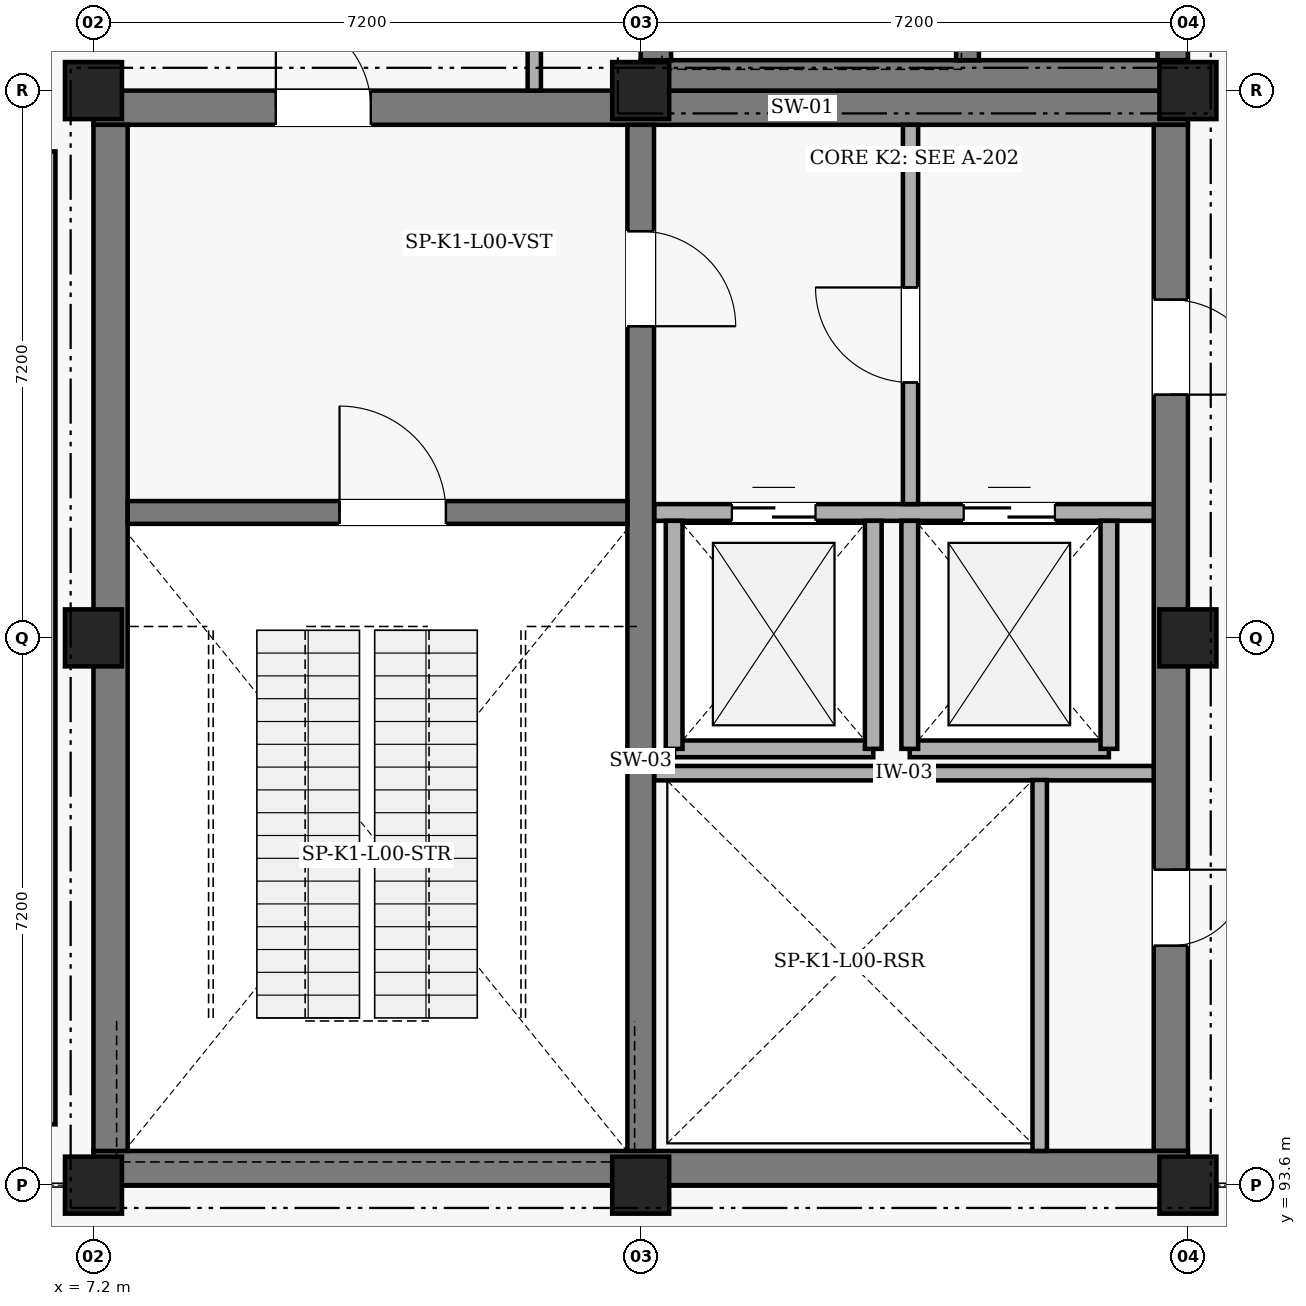
"""IFC4 building model, lengths in metres.
Left out: names, types, materials, properties, quantities, classifications, styles, units other than length and angle.
Written with IfcOpenShell. Run it as: python <this file> out.ifc"""

import sys

from ifc_helpers import new_model, si_unit, direction, frame, frame_2d, origin, origin_2d, place, context, subcontext, project, spatial, rectangle, extrude, element, fill, save


model = new_model("IFC4")
c1 = context("Model", 3, precision=1e-05, world=origin(), true_north=direction((0.0, 1.0)))
c2 = subcontext(c1, "Body", "Model", "MODEL_VIEW")
j1 = project(units=[si_unit("LENGTHUNIT", "METRE"), si_unit("PLANEANGLEUNIT", "RADIAN")], contexts=[c1])
p1 = place(None, origin())
s1 = spatial("IfcSite", under=j1, at=p1, CompositionType="ELEMENT")
p2 = place(p1, origin())
s2 = spatial("IfcBuilding", under=s1, at=p2, CompositionType="ELEMENT")
p3 = place(p2, origin())
s3 = spatial("IfcBuildingStorey", under=s2, at=p3, CompositionType="ELEMENT", Elevation=0.0)
p4 = place(p3, frame((7.2, 107.775, 0.0), z_axis=(0.0, 0.0, 1.0), x_axis=(1.0, 0.0, 0.0)))
e1 = element("IfcWall", 1, at=p4, inside=s3, PredefinedType="SHEAR", context=c2, shape_type="SweptSolid", body=[
    extrude(rectangle(XDim=14.4, YDim=0.45, at=frame_2d((7.2, 0.0))), origin(), (0.0, 0.0, 1.0), 5.4),
])
p5 = place(p4, frame((2.4, 0.0, 0.0)))
e2 = element("IfcOpeningElement", 2, at=p5, cuts=e1, PredefinedType="OPENING", context=c2, shape_type="SweptSolid", body=[
    extrude(rectangle(XDim=1.25, YDim=2.2, at=frame_2d((0.625, 1.1))), frame((0.0, 0.235, 0.0), z_axis=(0.0, -1.0, 0.0), x_axis=(1.0, 0.0, 0.0)), (0.0, 0.0, 1.0), 0.47),
])
p6 = place(p3, frame((21.375, 107.55, 0.0), z_axis=(0.0, 0.0, 1.0), x_axis=(0.0, -1.0, 0.0)))
e3 = element("IfcWall", 3, at=p6, inside=s3, PredefinedType="SHEAR", context=c2, shape_type="SweptSolid", body=[
    extrude(rectangle(XDim=13.5, YDim=0.45, at=frame_2d((6.75, 0.0))), origin(), (0.0, 0.0, 1.0), 5.4),
])
p7 = place(p6, frame((9.8, 0.0, 0.0)))
e4 = element("IfcOpeningElement", 4, at=p7, cuts=e3, PredefinedType="OPENING", context=c2, shape_type="SweptSolid", body=[
    extrude(rectangle(XDim=1.0, YDim=2.15, at=frame_2d((0.5, 1.075))), frame((0.0, 0.235, 0.0), z_axis=(0.0, -1.0, 0.0), x_axis=(1.0, 0.0, 0.0)), (0.0, 0.0, 1.0), 0.47),
])
p8 = place(p6, frame((2.3, 0.0, 0.0)))
e5 = element("IfcOpeningElement", 5, at=p8, cuts=e3, PredefinedType="OPENING", context=c2, shape_type="SweptSolid", body=[
    extrude(rectangle(XDim=1.25, YDim=2.2, at=frame_2d((0.625, 1.1))), frame((0.0, 0.235, 0.0), z_axis=(0.0, -1.0, 0.0), x_axis=(1.0, 0.0, 0.0)), (0.0, 0.0, 1.0), 0.47),
])
p9 = place(p3, frame((21.6, 93.825, 0.0), z_axis=(0.0, 0.0, 1.0), x_axis=(-1.0, 0.0, 0.0)))
e6 = element("IfcWall", 6, at=p9, inside=s3, PredefinedType="SHEAR", context=c2, shape_type="SweptSolid", body=[
    extrude(rectangle(XDim=14.4, YDim=0.45, at=frame_2d((7.2, 0.0))), origin(), (0.0, 0.0, 1.0), 5.4),
])
p10 = place(p3, frame((7.425, 94.05, 0.0), z_axis=(0.0, 0.0, 1.0), x_axis=(0.0, 1.0, 0.0)))
e7 = element("IfcWall", 7, at=p10, inside=s3, PredefinedType="SHEAR", context=c2, shape_type="SweptSolid", body=[
    extrude(rectangle(XDim=13.5, YDim=0.45, at=frame_2d((6.75, 0.0))), origin(), (0.0, 0.0, 1.0), 5.4),
])
p11 = place(p3, frame((14.4, 107.55, 0.0), z_axis=(0.0, 0.0, 1.0), x_axis=(0.0, -1.0, 0.0)))
e8 = element("IfcWall", 8, at=p11, inside=s3, PredefinedType="SHEAR", context=c2, shape_type="SweptSolid", body=[
    extrude(rectangle(XDim=13.5, YDim=0.35, at=frame_2d((6.75, 0.0))), origin(), (0.0, 0.0, 1.0), 5.4),
])
p12 = place(p11, frame((1.4, 0.0, 0.0)))
e9 = element("IfcOpeningElement", 9, at=p12, cuts=e8, PredefinedType="OPENING", context=c2, shape_type="SweptSolid", body=[
    extrude(rectangle(XDim=1.25, YDim=2.2, at=frame_2d((0.625, 1.1))), frame((0.0, 0.185, 0.0), z_axis=(0.0, -1.0, 0.0), x_axis=(1.0, 0.0, 0.0)), (0.0, 0.0, 1.0), 0.37),
])
p13 = place(p3, frame((7.65, 102.45, 0.0), z_axis=(0.0, 0.0, 1.0), x_axis=(1.0, 0.0, 0.0)))
e10 = element("IfcWall", 10, at=p13, inside=s3, PredefinedType="SHEAR", context=c2, shape_type="SweptSolid", body=[
    extrude(rectangle(XDim=6.575, YDim=0.3, at=frame_2d((3.288, 0.0))), origin(), (0.0, 0.0, 1.0), 5.4),
])
p14 = place(p13, frame((2.788, 0.0, 0.0)))
e11 = element("IfcOpeningElement", 11, at=p14, cuts=e10, PredefinedType="OPENING", context=c2, shape_type="SweptSolid", body=[
    extrude(rectangle(XDim=1.4, YDim=2.2, at=frame_2d((0.7, 1.1))), frame((0.0, 0.16, 0.0), z_axis=(0.0, -1.0, 0.0), x_axis=(1.0, 0.0, 0.0)), (0.0, 0.0, 1.0), 0.32),
])
p15 = place(p3, frame((21.4, 122.0, 0.0), z_axis=(0.0, 0.0, 1.0), x_axis=(0.0, -1.0, 0.0)))
e12 = element("IfcWall", 12, at=p15, inside=s3, PredefinedType="SHEAR", context=c2, shape_type="SweptSolid", body=[
    extrude(rectangle(XDim=13.6, YDim=0.4, at=frame_2d((6.8, 0.0))), origin(), (0.0, 0.0, 1.0), 5.4),
])
p16 = place(p15, frame((2.3, 0.0, 0.0)))
e13 = element("IfcOpeningElement", 13, at=p16, cuts=e12, PredefinedType="OPENING", context=c2, shape_type="SweptSolid", body=[
    extrude(rectangle(XDim=1.25, YDim=2.2, at=frame_2d((0.625, 1.1))), frame((0.0, 0.21, 0.0), z_axis=(0.0, -1.0, 0.0), x_axis=(1.0, 0.0, 0.0)), (0.0, 0.0, 1.0), 0.42),
])
p17 = place(p3, frame((21.6, 108.2, 0.0), z_axis=(0.0, 0.0, 1.0), x_axis=(-1.0, 0.0, 0.0)))
e14 = element("IfcWall", 14, at=p17, inside=s3, PredefinedType="SHEAR", context=c2, shape_type="SweptSolid", body=[
    extrude(rectangle(XDim=7.2, YDim=0.4, at=frame_2d((3.6, 0.0))), origin(), (0.0, 0.0, 1.0), 5.4),
])
p18 = place(p3, frame((14.6, 108.4, 0.0), z_axis=(0.0, 0.0, 1.0), x_axis=(0.0, 1.0, 0.0)))
e15 = element("IfcWall", 15, at=p18, inside=s3, PredefinedType="SHEAR", context=c2, shape_type="SweptSolid", body=[
    extrude(rectangle(XDim=13.6, YDim=0.4, at=frame_2d((6.8, 0.0))), origin(), (0.0, 0.0, 1.0), 5.4),
])
p19 = place(p18, frame((9.8, 0.0, 0.0)))
e16 = element("IfcOpeningElement", 16, at=p19, cuts=e15, PredefinedType="OPENING", context=c2, shape_type="SweptSolid", body=[
    extrude(rectangle(XDim=1.25, YDim=2.2, at=frame_2d((0.625, 1.1))), frame((0.0, 0.21, 0.0), z_axis=(0.0, -1.0, 0.0), x_axis=(1.0, 0.0, 0.0)), (0.0, 0.0, 1.0), 0.42),
])
p20 = place(p3, frame((18.7, 116.7, 0.0), z_axis=(0.0, 0.0, 1.0), x_axis=(0.0, -1.0, 0.0)))
e17 = element("IfcWall", 17, at=p20, inside=s3, PredefinedType="SHEAR", context=c2, shape_type="SweptSolid", body=[
    extrude(rectangle(XDim=8.3, YDim=0.3, at=frame_2d((4.15, 0.0))), origin(), (0.0, 0.0, 1.0), 5.4),
])
for number, where, z_axis, x_axis in (
    (18, (7.2, 93.6, 0.0), (0.0, 0.0, 1.0), (1.0, 0.0, 0.0)),
    (19, (7.2, 100.8, 0.0), (0.0, 0.0, 1.0), (1.0, 0.0, 0.0)),
    (20, (7.2, 108.0, 0.0), (0.0, 0.0, 1.0), (1.0, 0.0, 0.0)),
    (21, (14.4, 93.6, 0.0), (0.0, 0.0, 1.0), (1.0, 0.0, 0.0)),
    (22, (14.4, 108.0, 0.0), (0.0, 0.0, 1.0), (1.0, 0.0, 0.0)),
    (23, (21.6, 93.6, 0.0), (0.0, 0.0, 1.0), (1.0, 0.0, 0.0)),
    (24, (21.6, 100.8, 0.0), (0.0, 0.0, 1.0), (1.0, 0.0, 0.0)),
    (25, (21.6, 108.0, 0.0), (0.0, 0.0, 1.0), (1.0, 0.0, 0.0)),
):
    element("IfcColumn", number, at=place(p3, frame(where, z_axis=z_axis, x_axis=x_axis)), inside=s3, PredefinedType="COLUMN", context=c2, shape_type="SweptSolid", body=[
        extrude(rectangle(XDim=0.75, YDim=0.75, at=origin_2d()), origin(), (0.0, 0.0, 1.0), 5.08),
    ])
p21 = place(p3, frame((14.58, 99.02, 0.0), z_axis=(0.0, 0.0, 1.0), x_axis=(1.0, 0.0, 0.0)))
e26 = element("IfcWall", 26, at=p21, inside=s3, PredefinedType="PARTITIONING", context=c2, shape_type="SweptSolid", body=[
    extrude(rectangle(XDim=6.57, YDim=0.19, at=frame_2d((3.285, 0.0))), origin(), (0.0, 0.0, 1.0), 5.05),
])
p22 = place(p3, frame((19.65, 94.05, 0.0), z_axis=(0.0, 0.0, 1.0), x_axis=(0.0, 1.0, 0.0)))
e27 = element("IfcWall", 27, at=p22, inside=s3, PredefinedType="PARTITIONING", context=c2, shape_type="SweptSolid", body=[
    extrude(rectangle(XDim=4.88, YDim=0.19, at=frame_2d((2.44, 0.0))), origin(), (0.0, 0.0, 1.0), 5.05),
])
p23 = place(p3, frame((14.58, 102.45, 0.0), z_axis=(0.0, 0.0, 1.0), x_axis=(1.0, 0.0, 0.0)))
e28 = element("IfcWall", 28, at=p23, inside=s3, PredefinedType="PARTITIONING", context=c2, shape_type="SweptSolid", body=[
    extrude(rectangle(XDim=6.57, YDim=0.22, at=frame_2d((3.285, 0.0))), origin(), (0.0, 0.0, 1.0), 5.05),
])
p24 = place(p23, frame((1.02, 0.0, 0.0)))
e29 = element("IfcOpeningElement", 29, at=p24, cuts=e28, PredefinedType="OPENING", context=c2, shape_type="SweptSolid", body=[
    extrude(rectangle(XDim=1.1, YDim=2.15, at=frame_2d((0.55, 1.075))), frame((0.0, 0.12, 0.0), z_axis=(0.0, -1.0, 0.0), x_axis=(1.0, 0.0, 0.0)), (0.0, 0.0, 1.0), 0.24),
])
p25 = place(p23, frame((4.07, 0.0, 0.0)))
e30 = element("IfcOpeningElement", 30, at=p25, cuts=e28, PredefinedType="OPENING", context=c2, shape_type="SweptSolid", body=[
    extrude(rectangle(XDim=1.2, YDim=2.15, at=frame_2d((0.6, 1.075))), frame((0.0, 0.12, 0.0), z_axis=(0.0, -1.0, 0.0), x_axis=(1.0, 0.0, 0.0)), (0.0, 0.0, 1.0), 0.24),
])
p26 = place(p3, frame((14.84, 99.34, 0.0), z_axis=(0.0, 0.0, 1.0), x_axis=(1.0, 0.0, 0.0)))
e31 = element("IfcWall", 31, at=p26, inside=s3, PredefinedType="PARTITIONING", context=c2, shape_type="SweptSolid", body=[
    extrude(rectangle(XDim=2.62, YDim=0.22, at=frame_2d((1.31, 0.0))), origin(), (0.0, 0.0, 1.0), 5.05),
])
for number, where, z_axis, x_axis in (
    (32, (14.84, 99.34, 0.0), (0.0, 0.0, 1.0), (0.0, 1.0, 0.0)),
    (33, (17.46, 99.34, 0.0), (0.0, 0.0, 1.0), (0.0, 1.0, 0.0)),
):
    element("IfcWall", number, at=place(p3, frame(where, z_axis=z_axis, x_axis=x_axis)), inside=s3, PredefinedType="PARTITIONING", context=c2, shape_type="SweptSolid", body=[
        extrude(rectangle(XDim=3.0, YDim=0.22, at=frame_2d((1.5, 0.0))), origin(), (0.0, 0.0, 1.0), 5.05),
    ])
p27 = place(p3, frame((17.94, 99.34, 0.0), z_axis=(0.0, 0.0, 1.0), x_axis=(1.0, 0.0, 0.0)))
e34 = element("IfcWall", 34, at=p27, inside=s3, PredefinedType="PARTITIONING", context=c2, shape_type="SweptSolid", body=[
    extrude(rectangle(XDim=2.62, YDim=0.22, at=frame_2d((1.31, 0.0))), origin(), (0.0, 0.0, 1.0), 5.05),
])
for number, where, z_axis, x_axis in (
    (35, (17.94, 99.34, 0.0), (0.0, 0.0, 1.0), (0.0, 1.0, 0.0)),
    (36, (20.56, 99.34, 0.0), (0.0, 0.0, 1.0), (0.0, 1.0, 0.0)),
):
    element("IfcWall", number, at=place(p3, frame(where, z_axis=z_axis, x_axis=x_axis)), inside=s3, PredefinedType="PARTITIONING", context=c2, shape_type="SweptSolid", body=[
        extrude(rectangle(XDim=3.0, YDim=0.22, at=frame_2d((1.5, 0.0))), origin(), (0.0, 0.0, 1.0), 5.05),
    ])
p28 = place(p3, frame((17.95, 102.56, 0.0), z_axis=(0.0, 0.0, 1.0), x_axis=(0.0, 1.0, 0.0)))
e37 = element("IfcWall", 37, at=p28, inside=s3, PredefinedType="PARTITIONING", context=c2, shape_type="SweptSolid", body=[
    extrude(rectangle(XDim=4.99, YDim=0.2, at=frame_2d((2.495, 0.0))), origin(), (0.0, 0.0, 1.0), 5.05),
])
p29 = place(p28, frame((1.6, 0.0, 0.0)))
e38 = element("IfcOpeningElement", 38, at=p29, cuts=e37, PredefinedType="OPENING", context=c2, shape_type="SweptSolid", body=[
    extrude(rectangle(XDim=1.25, YDim=2.2, at=frame_2d((0.625, 1.1))), frame((0.0, 0.11, 0.0), z_axis=(0.0, -1.0, 0.0), x_axis=(1.0, 0.0, 0.0)), (0.0, 0.0, 1.0), 0.22),
])
p30 = place(p3, frame((6.6, 107.2, 0.0), z_axis=(0.0, 0.0, 1.0), x_axis=(0.0, -1.0, 0.0)))
e39 = element("IfcWall", 39, at=p30, inside=s3, PredefinedType="PARTITIONING", context=c2, shape_type="SweptSolid", body=[
    extrude(rectangle(XDim=12.8, YDim=0.2, at=frame_2d((6.4, 0.0))), origin(), (0.0, 0.0, 1.0), 4.63),
])
p31 = place(p3, frame((13.0, 115.0, 0.0), z_axis=(0.0, 0.0, 1.0), x_axis=(0.0, -1.0, 0.0)))
e40 = element("IfcWall", 40, at=p31, inside=s3, PredefinedType="PARTITIONING", context=c2, shape_type="SweptSolid", body=[
    extrude(rectangle(XDim=7.0, YDim=0.175, at=frame_2d((3.5, 0.0))), origin(), (0.0, 0.0, 1.0), 4.75),
])
p32 = place(p31, frame((2.875, 0.0, 0.0)))
e41 = element("IfcOpeningElement", 41, at=p32, cuts=e40, PredefinedType="OPENING", context=c2, shape_type="SweptSolid", body=[
    extrude(rectangle(XDim=1.25, YDim=2.2, at=frame_2d((0.625, 1.1))), frame((0.0, 0.097, 0.0), z_axis=(0.0, -1.0, 0.0), x_axis=(1.0, 0.0, 0.0)), (0.0, 0.0, 1.0), 0.195),
])
p33 = place(p14, origin())
e42 = element("IfcDoor", 42, at=p33, inside=s3, OperationType="SINGLE_SWING_LEFT", PredefinedType="DOOR", context=c2, shape_type="SweptSolid", body=[
    extrude(rectangle(XDim=1.4, YDim=2.2, at=frame_2d((0.7, 1.1))), frame((0.0, 0.025, 0.0), z_axis=(0.0, -1.0, 0.0), x_axis=(1.0, 0.0, 0.0)), (0.0, 0.0, 1.0), 0.05),
])
fill(e11, e42)
p34 = place(p12, origin())
e43 = element("IfcDoor", 43, at=p34, inside=s3, OperationType="SINGLE_SWING_RIGHT", PredefinedType="DOOR", context=c2, shape_type="SweptSolid", body=[
    extrude(rectangle(XDim=1.25, YDim=2.2, at=frame_2d((0.625, 1.1))), frame((0.0, 0.025, 0.0), z_axis=(0.0, -1.0, 0.0), x_axis=(1.0, 0.0, 0.0)), (0.0, 0.0, 1.0), 0.05),
])
fill(e9, e43)
p35 = place(p7, origin())
e44 = element("IfcDoor", 44, at=p35, inside=s3, OperationType="SINGLE_SWING_LEFT", PredefinedType="DOOR", context=c2, shape_type="SweptSolid", body=[
    extrude(rectangle(XDim=1.0, YDim=2.15, at=frame_2d((0.5, 1.075))), frame((0.0, 0.025, 0.0), z_axis=(0.0, -1.0, 0.0), x_axis=(1.0, 0.0, 0.0)), (0.0, 0.0, 1.0), 0.05),
])
fill(e4, e44)
p36 = place(p24, origin())
e45 = element("IfcDoor", 45, at=p36, inside=s3, OperationType="DOUBLE_DOOR_SLIDING", PredefinedType="DOOR", context=c2, shape_type="SweptSolid", body=[
    extrude(rectangle(XDim=1.1, YDim=2.15, at=frame_2d((0.55, 1.075))), frame((0.0, 0.025, 0.0), z_axis=(0.0, -1.0, 0.0), x_axis=(1.0, 0.0, 0.0)), (0.0, 0.0, 1.0), 0.05),
])
fill(e29, e45)
p37 = place(p25, origin())
e46 = element("IfcDoor", 46, at=p37, inside=s3, OperationType="DOUBLE_DOOR_SLIDING", PredefinedType="DOOR", context=c2, shape_type="SweptSolid", body=[
    extrude(rectangle(XDim=1.2, YDim=2.15, at=frame_2d((0.6, 1.075))), frame((0.0, 0.025, 0.0), z_axis=(0.0, -1.0, 0.0), x_axis=(1.0, 0.0, 0.0)), (0.0, 0.0, 1.0), 0.05),
])
fill(e30, e46)
p38 = place(p29, origin())
e47 = element("IfcDoor", 47, at=p38, inside=s3, OperationType="SINGLE_SWING_RIGHT", PredefinedType="DOOR", context=c2, shape_type="SweptSolid", body=[
    extrude(rectangle(XDim=1.25, YDim=2.2, at=frame_2d((0.625, 1.1))), frame((0.0, 0.025, 0.0), z_axis=(0.0, -1.0, 0.0), x_axis=(1.0, 0.0, 0.0)), (0.0, 0.0, 1.0), 0.05),
])
fill(e38, e47)
p39 = place(p5, origin())
e48 = element("IfcDoor", 48, at=p39, inside=s3, OperationType="SINGLE_SWING_LEFT", PredefinedType="DOOR", context=c2, shape_type="SweptSolid", body=[
    extrude(rectangle(XDim=1.25, YDim=2.2, at=frame_2d((0.625, 1.1))), frame((0.0, 0.025, 0.0), z_axis=(0.0, -1.0, 0.0), x_axis=(1.0, 0.0, 0.0)), (0.0, 0.0, 1.0), 0.05),
])
fill(e2, e48)
p40 = place(p8, origin())
e49 = element("IfcDoor", 49, at=p40, inside=s3, OperationType="SINGLE_SWING_RIGHT", PredefinedType="DOOR", context=c2, shape_type="SweptSolid", body=[
    extrude(rectangle(XDim=1.25, YDim=2.2, at=frame_2d((0.625, 1.1))), frame((0.0, 0.025, 0.0), z_axis=(0.0, -1.0, 0.0), x_axis=(1.0, 0.0, 0.0)), (0.0, 0.0, 1.0), 0.05),
])
fill(e5, e49)
save(model, sys.argv[1])
